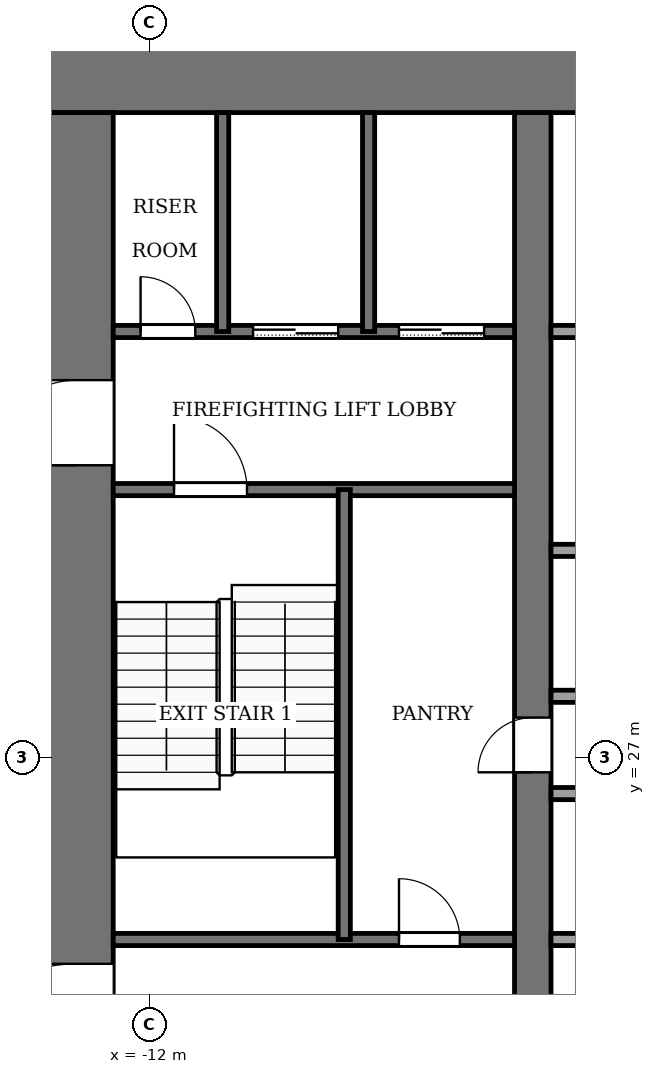
"""IFC4 building model, lengths in metres.
Left out: names, types, materials, properties, quantities, classifications, styles, units other than length and angle.
Written with IfcOpenShell. Run it as: python <this file> out.ifc"""

import sys

from ifc_helpers import new_model, si_unit, direction, frame, frame_2d, origin, place, context, subcontext, project, spatial, rectangle, extrude, element, fill, save


model = new_model("IFC4")
c1 = context("Model", 3, precision=1e-05, world=origin(), true_north=direction((0.0, 1.0)))
c2 = subcontext(c1, "Body", "Model", "MODEL_VIEW")
j1 = project(units=[si_unit("LENGTHUNIT", "METRE"), si_unit("PLANEANGLEUNIT", "RADIAN")], contexts=[c1])
p1 = place(None, origin())
s1 = spatial("IfcSite", under=j1, at=p1, CompositionType="ELEMENT")
p2 = place(p1, origin())
s2 = spatial("IfcBuilding", under=s1, at=p2, CompositionType="ELEMENT")
p3 = place(p2, frame((0.0, 0.0, 86.0)))
s3 = spatial("IfcBuildingStorey", under=s2, at=p3, CompositionType="ELEMENT", Elevation=86.0)
p4 = place(p3, frame((-13.8, 38.2, -0.13), z_axis=(0.0, 0.0, 1.0), x_axis=(1.0, 0.0, 0.0)))
e1 = element("IfcWall", 1, at=p4, inside=s3, PredefinedType="SHEAR", context=c2, shape_type="SweptSolid", body=[
    extrude(rectangle(XDim=27.6, YDim=1.2, at=frame_2d((13.8, 0.0))), origin(), (0.0, 0.0, 1.0), 4.0),
])
p5 = place(p3, frame((-13.2, 18.4, -0.13), z_axis=(0.0, 0.0, 1.0), x_axis=(0.0, 1.0, 0.0)))
e2 = element("IfcWall", 2, at=p5, inside=s3, PredefinedType="SHEAR", context=c2, shape_type="SweptSolid", body=[
    extrude(rectangle(XDim=19.2, YDim=1.2, at=frame_2d((9.6, 0.0))), origin(), (0.0, 0.0, 1.0), 4.0),
])
p6 = place(p5, frame((2.8, 0.0, 0.13)))
e3 = element("IfcOpeningElement", 3, at=p6, cuts=e2, PredefinedType="OPENING", context=c2, shape_type="SweptSolid", body=[
    extrude(rectangle(XDim=2.4, YDim=2.4, at=frame_2d((1.2, 1.2))), frame((0.0, 0.61, 0.0), z_axis=(0.0, -1.0, 0.0), x_axis=(1.0, 0.0, 0.0)), (0.0, 0.0, 1.0), 1.22),
])
p7 = place(p5, frame((13.4, 0.0, 0.13)))
e4 = element("IfcOpeningElement", 4, at=p7, cuts=e2, PredefinedType="OPENING", context=c2, shape_type="SweptSolid", body=[
    extrude(rectangle(XDim=1.4, YDim=2.2, at=frame_2d((0.7, 1.1))), frame((0.0, 0.61, 0.0), z_axis=(0.0, -1.0, 0.0), x_axis=(1.0, 0.0, 0.0)), (0.0, 0.0, 1.0), 1.22),
])
p8 = place(p3, frame((-5.7, 18.4, -0.13), z_axis=(0.0, 0.0, 1.0), x_axis=(0.0, 1.0, 0.0)))
e5 = element("IfcWall", 5, at=p8, inside=s3, PredefinedType="SHEAR", context=c2, shape_type="SweptSolid", body=[
    extrude(rectangle(XDim=19.2, YDim=0.6, at=frame_2d((9.6, 0.0))), origin(), (0.0, 0.0, 1.0), 4.0),
])
p9 = place(p8, frame((8.35, 0.0, 0.13)))
e6 = element("IfcOpeningElement", 6, at=p9, cuts=e5, PredefinedType="OPENING", context=c2, shape_type="SweptSolid", body=[
    extrude(rectangle(XDim=0.9, YDim=2.1, at=frame_2d((0.45, 1.05))), frame((0.0, 0.31, 0.0), z_axis=(0.0, -1.0, 0.0), x_axis=(1.0, 0.0, 0.0)), (0.0, 0.0, 1.0), 0.62),
])
p10 = place(p3, frame((-12.6, 24.0, 0.0), z_axis=(0.0, 0.0, 1.0), x_axis=(1.0, 0.0, 0.0)))
e7 = element("IfcWall", 7, at=p10, inside=s3, PredefinedType="PARTITIONING", context=c2, shape_type="SweptSolid", body=[
    extrude(rectangle(XDim=6.6, YDim=0.2, at=frame_2d((3.3, 0.0))), origin(), (0.0, 0.0, 1.0), 3.87),
])
p11 = place(p10, frame((4.7, 0.0, 0.0)))
e8 = element("IfcOpeningElement", 8, at=p11, cuts=e7, PredefinedType="OPENING", context=c2, shape_type="SweptSolid", body=[
    extrude(rectangle(XDim=1.0, YDim=2.1, at=frame_2d((0.5, 1.05))), frame((0.0, 0.11, 0.0), z_axis=(0.0, -1.0, 0.0), x_axis=(1.0, 0.0, 0.0)), (0.0, 0.0, 1.0), 0.22),
])
p12 = place(p3, frame((-5.4, 24.0, 0.0), z_axis=(0.0, 0.0, 1.0), x_axis=(1.0, 0.0, 0.0)))
e9 = element("IfcWall", 9, at=p12, inside=s3, PredefinedType="PARTITIONING", context=c2, shape_type="SweptSolid", body=[
    extrude(rectangle(XDim=10.8, YDim=0.2, at=frame_2d((5.4, 0.0))), origin(), (0.0, 0.0, 1.0), 3.87),
])
p13 = place(p12, frame((0.75, 0.0, 0.0)))
e10 = element("IfcOpeningElement", 10, at=p13, cuts=e9, PredefinedType="OPENING", context=c2, shape_type="SweptSolid", body=[
    extrude(rectangle(XDim=1.2, YDim=2.2, at=frame_2d((0.6, 1.1))), frame((0.0, 0.11, 0.0), z_axis=(0.0, -1.0, 0.0), x_axis=(1.0, 0.0, 0.0)), (0.0, 0.0, 1.0), 0.22),
])
p14 = place(p12, frame((3.45, 0.0, 0.0)))
e11 = element("IfcOpeningElement", 11, at=p14, cuts=e9, PredefinedType="OPENING", context=c2, shape_type="SweptSolid", body=[
    extrude(rectangle(XDim=1.2, YDim=2.2, at=frame_2d((0.6, 1.1))), frame((0.0, 0.11, 0.0), z_axis=(0.0, -1.0, 0.0), x_axis=(1.0, 0.0, 0.0)), (0.0, 0.0, 1.0), 0.22),
])
p15 = place(p12, frame((6.15, 0.0, 0.0)))
e12 = element("IfcOpeningElement", 12, at=p15, cuts=e9, PredefinedType="OPENING", context=c2, shape_type="SweptSolid", body=[
    extrude(rectangle(XDim=1.2, YDim=2.2, at=frame_2d((0.6, 1.1))), frame((0.0, 0.11, 0.0), z_axis=(0.0, -1.0, 0.0), x_axis=(1.0, 0.0, 0.0)), (0.0, 0.0, 1.0), 0.22),
])
p16 = place(p12, frame((8.85, 0.0, 0.0)))
e13 = element("IfcOpeningElement", 13, at=p16, cuts=e9, PredefinedType="OPENING", context=c2, shape_type="SweptSolid", body=[
    extrude(rectangle(XDim=1.2, YDim=2.2, at=frame_2d((0.6, 1.1))), frame((0.0, 0.11, 0.0), z_axis=(0.0, -1.0, 0.0), x_axis=(1.0, 0.0, 0.0)), (0.0, 0.0, 1.0), 0.22),
])
for number, where, z_axis, x_axis in (
    (14, (-5.4, 26.4, 0.0), (0.0, 0.0, 1.0), (1.0, 0.0, 0.0)),
    (15, (-5.4, 28.0, 0.0), (0.0, 0.0, 1.0), (1.0, 0.0, 0.0)),
    (16, (-5.4, 30.4, 0.0), (0.0, 0.0, 1.0), (1.0, 0.0, 0.0)),
):
    element("IfcWall", number, at=place(p3, frame(where, z_axis=z_axis, x_axis=x_axis)), inside=s3, PredefinedType="PARTITIONING", context=c2, shape_type="SweptSolid", body=[
        extrude(rectangle(XDim=10.8, YDim=0.2, at=frame_2d((5.4, 0.0))), origin(), (0.0, 0.0, 1.0), 3.87),
    ])
p17 = place(p3, frame((-12.6, 31.4, 0.0), z_axis=(0.0, 0.0, 1.0), x_axis=(1.0, 0.0, 0.0)))
e17 = element("IfcWall", 17, at=p17, inside=s3, PredefinedType="PARTITIONING", context=c2, shape_type="SweptSolid", body=[
    extrude(rectangle(XDim=6.6, YDim=0.2, at=frame_2d((3.3, 0.0))), origin(), (0.0, 0.0, 1.0), 3.87),
])
p18 = place(p17, frame((1.0, 0.0, 0.0)))
e18 = element("IfcOpeningElement", 18, at=p18, cuts=e17, PredefinedType="OPENING", context=c2, shape_type="SweptSolid", body=[
    extrude(rectangle(XDim=1.2, YDim=2.2, at=frame_2d((0.6, 1.1))), frame((0.0, 0.11, 0.0), z_axis=(0.0, -1.0, 0.0), x_axis=(1.0, 0.0, 0.0)), (0.0, 0.0, 1.0), 0.22),
])
p19 = place(p3, frame((-12.6, 34.0, 0.0), z_axis=(0.0, 0.0, 1.0), x_axis=(1.0, 0.0, 0.0)))
e19 = element("IfcWall", 19, at=p19, inside=s3, PredefinedType="PARTITIONING", context=c2, shape_type="SweptSolid", body=[
    extrude(rectangle(XDim=6.6, YDim=0.2, at=frame_2d((3.3, 0.0))), origin(), (0.0, 0.0, 1.0), 3.87),
])
p20 = place(p19, frame((4.7, 0.0, 0.0)))
e20 = element("IfcOpeningElement", 20, at=p20, cuts=e19, PredefinedType="OPENING", context=c2, shape_type="SweptSolid", body=[
    extrude(rectangle(XDim=1.4, YDim=2.2, at=frame_2d((0.7, 1.1))), frame((0.0, 0.11, 0.0), z_axis=(0.0, -1.0, 0.0), x_axis=(1.0, 0.0, 0.0)), (0.0, 0.0, 1.0), 0.22),
])
p21 = place(p19, frame((2.3, 0.0, 0.0)))
e21 = element("IfcOpeningElement", 21, at=p21, cuts=e19, PredefinedType="OPENING", context=c2, shape_type="SweptSolid", body=[
    extrude(rectangle(XDim=1.4, YDim=2.2, at=frame_2d((0.7, 1.1))), frame((0.0, 0.11, 0.0), z_axis=(0.0, -1.0, 0.0), x_axis=(1.0, 0.0, 0.0)), (0.0, 0.0, 1.0), 0.22),
])
p22 = place(p19, frame((0.45, 0.0, 0.0)))
e22 = element("IfcOpeningElement", 22, at=p22, cuts=e19, PredefinedType="OPENING", context=c2, shape_type="SweptSolid", body=[
    extrude(rectangle(XDim=0.9, YDim=2.1, at=frame_2d((0.45, 1.05))), frame((0.0, 0.11, 0.0), z_axis=(0.0, -1.0, 0.0), x_axis=(1.0, 0.0, 0.0)), (0.0, 0.0, 1.0), 0.22),
])
p23 = place(p3, frame((-5.4, 34.0, 0.0), z_axis=(0.0, 0.0, 1.0), x_axis=(1.0, 0.0, 0.0)))
e23 = element("IfcWall", 23, at=p23, inside=s3, PredefinedType="PARTITIONING", context=c2, shape_type="SweptSolid", body=[
    extrude(rectangle(XDim=10.8, YDim=0.2, at=frame_2d((5.4, 0.0))), origin(), (0.0, 0.0, 1.0), 3.87),
])
p24 = place(p23, frame((6.15, 0.0, 0.0)))
e24 = element("IfcOpeningElement", 24, at=p24, cuts=e23, PredefinedType="OPENING", context=c2, shape_type="SweptSolid", body=[
    extrude(rectangle(XDim=1.2, YDim=2.2, at=frame_2d((0.6, 1.1))), frame((0.0, 0.11, 0.0), z_axis=(0.0, -1.0, 0.0), x_axis=(1.0, 0.0, 0.0)), (0.0, 0.0, 1.0), 0.22),
])
p25 = place(p23, frame((8.95, 0.0, 0.0)))
e25 = element("IfcOpeningElement", 25, at=p25, cuts=e23, PredefinedType="OPENING", context=c2, shape_type="SweptSolid", body=[
    extrude(rectangle(XDim=1.0, YDim=2.1, at=frame_2d((0.5, 1.05))), frame((0.0, 0.11, 0.0), z_axis=(0.0, -1.0, 0.0), x_axis=(1.0, 0.0, 0.0)), (0.0, 0.0, 1.0), 0.22),
])
p26 = place(p3, frame((-10.8, 34.0, 0.0), z_axis=(0.0, 0.0, 1.0), x_axis=(0.0, 1.0, 0.0)))
e26 = element("IfcWall", 26, at=p26, inside=s3, PredefinedType="PARTITIONING", context=c2, shape_type="SweptSolid", body=[
    extrude(rectangle(XDim=3.6, YDim=0.2, at=frame_2d((1.8, 0.0))), origin(), (0.0, 0.0, 1.0), 3.87),
])
p27 = place(p3, frame((-8.8, 24.0, 0.0), z_axis=(0.0, 0.0, 1.0), x_axis=(0.0, 1.0, 0.0)))
e27 = element("IfcWall", 27, at=p27, inside=s3, PredefinedType="PARTITIONING", context=c2, shape_type="SweptSolid", body=[
    extrude(rectangle(XDim=7.4, YDim=0.2, at=frame_2d((3.7, 0.0))), origin(), (0.0, 0.0, 1.0), 3.87),
])
p28 = place(p3, frame((-8.4, 34.0, 0.0), z_axis=(0.0, 0.0, 1.0), x_axis=(0.0, 1.0, 0.0)))
e28 = element("IfcWall", 28, at=p28, inside=s3, PredefinedType="PARTITIONING", context=c2, shape_type="SweptSolid", body=[
    extrude(rectangle(XDim=3.6, YDim=0.2, at=frame_2d((1.8, 0.0))), origin(), (0.0, 0.0, 1.0), 3.87),
])
p29 = place(p20, origin())
e29 = element("IfcDoor", 29, at=p29, inside=s3, OperationType="SLIDING_TO_LEFT", PredefinedType="DOOR", context=c2, shape_type="SweptSolid", body=[
    extrude(rectangle(XDim=1.4, YDim=2.2, at=frame_2d((0.7, 1.1))), frame((0.0, 0.025, 0.0), z_axis=(0.0, -1.0, 0.0), x_axis=(1.0, 0.0, 0.0)), (0.0, 0.0, 1.0), 0.05),
])
fill(e20, e29)
p30 = place(p21, origin())
e30 = element("IfcDoor", 30, at=p30, inside=s3, OperationType="SLIDING_TO_LEFT", PredefinedType="DOOR", context=c2, shape_type="SweptSolid", body=[
    extrude(rectangle(XDim=1.4, YDim=2.2, at=frame_2d((0.7, 1.1))), frame((0.0, 0.025, 0.0), z_axis=(0.0, -1.0, 0.0), x_axis=(1.0, 0.0, 0.0)), (0.0, 0.0, 1.0), 0.05),
])
fill(e21, e30)
p31 = place(p22, origin())
e31 = element("IfcDoor", 31, at=p31, inside=s3, OperationType="SINGLE_SWING_RIGHT", PredefinedType="DOOR", context=c2, shape_type="SweptSolid", body=[
    extrude(rectangle(XDim=0.9, YDim=2.1, at=frame_2d((0.45, 1.05))), frame((0.0, 0.025, 0.0), z_axis=(0.0, -1.0, 0.0), x_axis=(1.0, 0.0, 0.0)), (0.0, 0.0, 1.0), 0.05),
])
fill(e22, e31)
p32 = place(p11, origin())
e32 = element("IfcDoor", 32, at=p32, inside=s3, OperationType="SINGLE_SWING_RIGHT", PredefinedType="DOOR", context=c2, shape_type="SweptSolid", body=[
    extrude(rectangle(XDim=1.0, YDim=2.1, at=frame_2d((0.5, 1.05))), frame((0.0, 0.025, 0.0), z_axis=(0.0, -1.0, 0.0), x_axis=(1.0, 0.0, 0.0)), (0.0, 0.0, 1.0), 0.05),
])
fill(e8, e32)
p33 = place(p9, origin())
e33 = element("IfcDoor", 33, at=p33, inside=s3, OperationType="SINGLE_SWING_RIGHT", PredefinedType="DOOR", context=c2, shape_type="SweptSolid", body=[
    extrude(rectangle(XDim=0.9, YDim=2.1, at=frame_2d((0.45, 1.05))), frame((0.0, 0.025, 0.0), z_axis=(0.0, -1.0, 0.0), x_axis=(1.0, 0.0, 0.0)), (0.0, 0.0, 1.0), 0.05),
])
fill(e6, e33)
p34 = place(p18, origin())
e34 = element("IfcDoor", 34, at=p34, inside=s3, OperationType="SINGLE_SWING_RIGHT", PredefinedType="DOOR", context=c2, shape_type="SweptSolid", body=[
    extrude(rectangle(XDim=1.2, YDim=2.2, at=frame_2d((0.6, 1.1))), frame((0.0, 0.025, 0.0), z_axis=(0.0, -1.0, 0.0), x_axis=(1.0, 0.0, 0.0)), (0.0, 0.0, 1.0), 0.05),
])
fill(e18, e34)
p35 = place(p6, origin())
e35 = element("IfcDoor", 35, at=p35, inside=s3, OperationType="DOUBLE_DOOR_SINGLE_SWING", PredefinedType="DOOR", context=c2, shape_type="SweptSolid", body=[
    extrude(rectangle(XDim=2.4, YDim=2.4, at=frame_2d((1.2, 1.2))), frame((0.0, 0.025, 0.0), z_axis=(0.0, -1.0, 0.0), x_axis=(1.0, 0.0, 0.0)), (0.0, 0.0, 1.0), 0.05),
])
fill(e3, e35)
p36 = place(p7, origin())
e36 = element("IfcDoor", 36, at=p36, inside=s3, OperationType="SINGLE_SWING_RIGHT", PredefinedType="DOOR", context=c2, shape_type="SweptSolid", body=[
    extrude(rectangle(XDim=1.4, YDim=2.2, at=frame_2d((0.7, 1.1))), frame((0.0, 0.025, 0.0), z_axis=(0.0, -1.0, 0.0), x_axis=(1.0, 0.0, 0.0)), (0.0, 0.0, 1.0), 0.05),
])
fill(e4, e36)
save(model, sys.argv[1])
